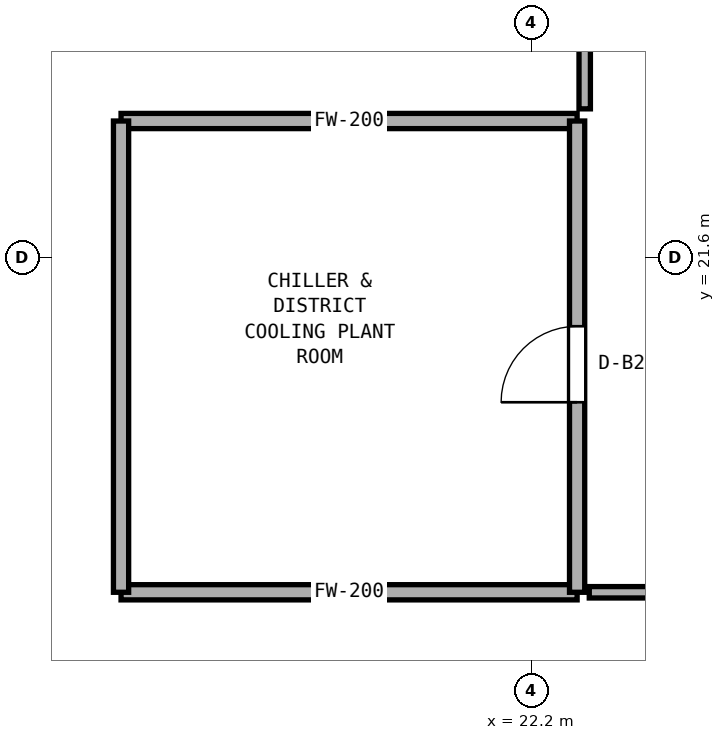
"""IFC4 building model, lengths in metres.
Left out: names, types, materials, properties, quantities, classifications, styles, units other than length and angle.
Written with IfcOpenShell. Run it as: python <this file> out.ifc"""

import sys

from ifc_helpers import new_model, si_unit, direction, frame, frame_2d, origin, place, context, subcontext, project, spatial, rectangle, extrude, element, fill, save


model = new_model("IFC4")
c1 = context("Model", 3, precision=1e-05, world=origin(), true_north=direction((0.0, 1.0)))
c2 = subcontext(c1, "Body", "Model", "MODEL_VIEW")
j1 = project(units=[si_unit("LENGTHUNIT", "METRE"), si_unit("PLANEANGLEUNIT", "RADIAN")], contexts=[c1])
p1 = place(None, origin())
s1 = spatial("IfcSite", under=j1, at=p1, CompositionType="ELEMENT")
p2 = place(p1, origin())
s2 = spatial("IfcBuilding", under=s1, at=p2, CompositionType="ELEMENT")
p3 = place(p2, frame((0.0, 0.0, -9.6)))
s3 = spatial("IfcBuildingStorey", under=s2, at=p3, CompositionType="ELEMENT", Elevation=-9.6)
for number, where, z_axis, x_axis in (
    (1, (16.8, 17.2, 0.0), (0.0, 0.0, 1.0), (1.0, 0.0, 0.0)),
    (2, (16.8, 23.4, 0.0), (0.0, 0.0, 1.0), (1.0, 0.0, 0.0)),
):
    element("IfcWall", number, at=place(p3, frame(where, z_axis=z_axis, x_axis=x_axis)), inside=s3, PredefinedType="SOLIDWALL", context=c2, shape_type="SweptSolid", body=[
        extrude(rectangle(XDim=6.0, YDim=0.2, at=frame_2d((3.0, 0.0))), origin(), (0.0, 0.0, 1.0), 4.45),
    ])
p4 = place(p3, frame((16.8, 17.2, 0.0), z_axis=(0.0, 0.0, 1.0), x_axis=(0.0, 1.0, 0.0)))
e3 = element("IfcWall", 3, at=p4, inside=s3, PredefinedType="SOLIDWALL", context=c2, shape_type="SweptSolid", body=[
    extrude(rectangle(XDim=6.2, YDim=0.2, at=frame_2d((3.1, 0.0))), origin(), (0.0, 0.0, 1.0), 4.45),
])
p5 = place(p3, frame((22.8, 17.2, 0.0), z_axis=(0.0, 0.0, 1.0), x_axis=(0.0, 1.0, 0.0)))
e4 = element("IfcWall", 4, at=p5, inside=s3, PredefinedType="SOLIDWALL", context=c2, shape_type="SweptSolid", body=[
    extrude(rectangle(XDim=6.2, YDim=0.2, at=frame_2d((3.1, 0.0))), origin(), (0.0, 0.0, 1.0), 4.45),
])
p6 = place(p5, frame((2.5, 0.0, 0.0)))
e5 = element("IfcOpeningElement", 5, at=p6, cuts=e4, PredefinedType="OPENING", context=c2, shape_type="SweptSolid", body=[
    extrude(rectangle(XDim=1.0, YDim=2.12, at=frame_2d((0.5, 1.06))), frame((0.0, 0.11, 0.0), z_axis=(0.0, -1.0, 0.0), x_axis=(1.0, 0.0, 0.0)), (0.0, 0.0, 1.0), 0.22),
])
p7 = place(p3, frame((22.9, 23.56, 0.0), z_axis=(0.0, 0.0, 1.0), x_axis=(0.0, 1.0, 0.0)))
e6 = element("IfcWall", 6, at=p7, inside=s3, PredefinedType="PARTITIONING", context=c2, shape_type="SweptSolid", body=[
    extrude(rectangle(XDim=3.28, YDim=0.15, at=frame_2d((1.64, 0.0))), origin(), (0.0, 0.0, 1.0), 4.45),
])
p8 = place(p3, frame((22.96, 17.2, 0.0), z_axis=(0.0, 0.0, 1.0), x_axis=(1.0, 0.0, 0.0)))
e7 = element("IfcWall", 7, at=p8, inside=s3, PredefinedType="PARTITIONING", context=c2, shape_type="SweptSolid", body=[
    extrude(rectangle(XDim=2.3, YDim=0.15, at=frame_2d((1.15, 0.0))), origin(), (0.0, 0.0, 1.0), 4.45),
])
p9 = place(p6, origin())
e8 = element("IfcDoor", 8, at=p9, inside=s3, OperationType="SINGLE_SWING_LEFT", PredefinedType="DOOR", context=c2, shape_type="SweptSolid", body=[
    extrude(rectangle(XDim=1.0, YDim=2.12, at=frame_2d((0.5, 1.06))), frame((0.0, 0.025, 0.0), z_axis=(0.0, -1.0, 0.0), x_axis=(1.0, 0.0, 0.0)), (0.0, 0.0, 1.0), 0.05),
])
fill(e5, e8)
save(model, sys.argv[1])
